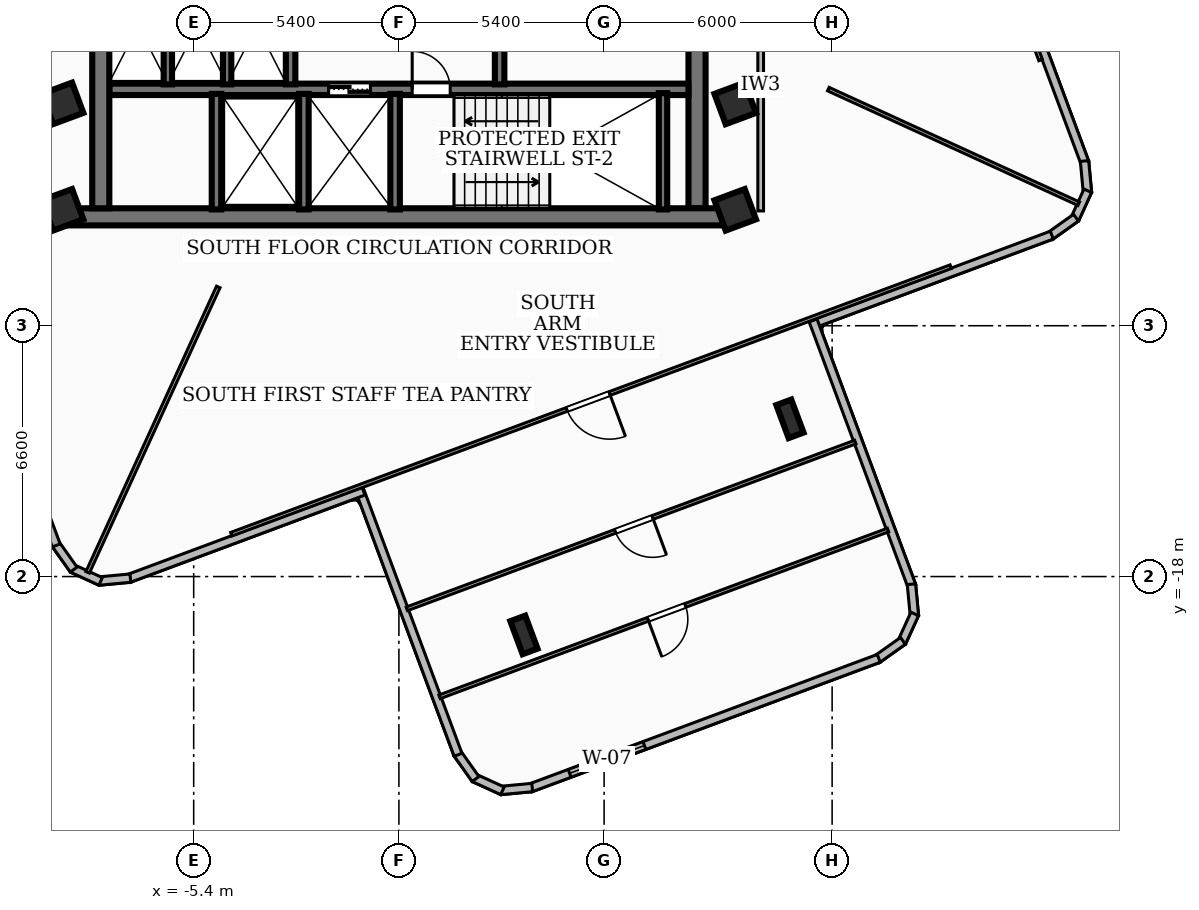
"""IFC4 building model, lengths in metres.
Left out: names, types, materials, properties, quantities, classifications, styles, units other than length and angle.
Written with IfcOpenShell. Run it as: python <this file> out.ifc"""

import sys

from ifc_helpers import new_model, si_unit, direction, frame, frame_2d, origin, origin_2d, place, context, subcontext, project, spatial, rectangle, i_section, extrude, element, fill, save


model = new_model("IFC4")
c1 = context("Model", 3, precision=1e-05, world=origin(), true_north=direction((0.0, 1.0)))
c2 = subcontext(c1, "Body", "Model", "MODEL_VIEW")
j1 = project(units=[si_unit("LENGTHUNIT", "METRE"), si_unit("PLANEANGLEUNIT", "RADIAN")], contexts=[c1])
p1 = place(None, origin())
s1 = spatial("IfcSite", under=j1, at=p1, CompositionType="ELEMENT")
p2 = place(p1, origin())
s2 = spatial("IfcBuilding", under=s1, at=p2, CompositionType="ELEMENT")
p3 = place(p2, frame((0.0, 0.0, 170.28)))
s3 = spatial("IfcBuildingStorey", under=s2, at=p3, CompositionType="ELEMENT", Elevation=170.28)
p4 = place(p3, frame((8.78, -8.535, 0.0), z_axis=(0.0, 0.0, 1.0), x_axis=(-1.0, 0.0, 0.0)))
e1 = element("IfcWall", 1, at=p4, inside=s3, PredefinedType="SHEAR", context=c2, shape_type="SweptSolid", body=[
    extrude(rectangle(XDim=17.56, YDim=0.45, at=frame_2d((8.78, 0.0))), origin(), (0.0, 0.0, 1.0), 3.34),
])
for number, where, z_axis, x_axis in (
    (2, (-7.845, -8.31, 0.0), (0.0, 0.0, 1.0), (0.0, 1.0, 0.0)),
    (3, (7.845, -1.975, 0.0), (0.0, 0.0, 1.0), (0.0, -1.0, 0.0)),
):
    element("IfcWall", number, at=place(p3, frame(where, z_axis=z_axis, x_axis=x_axis)), inside=s3, PredefinedType="SHEAR", context=c2, shape_type="SweptSolid", body=[
        extrude(rectangle(XDim=6.335, YDim=0.45, at=frame_2d((3.167, 0.0))), origin(), (0.0, 0.0, 1.0), 3.34),
    ])
p5 = place(p3, frame((-7.62, -5.18, 0.0), z_axis=(0.0, 0.0, 1.0), x_axis=(1.0, 0.0, 0.0)))
e4 = element("IfcWall", 4, at=p5, inside=s3, PredefinedType="SOLIDWALL", context=c2, shape_type="SweptSolid", body=[
    extrude(rectangle(XDim=15.24, YDim=0.3, at=frame_2d((7.62, 0.0))), origin(), (0.0, 0.0, 1.0), 3.34),
])
p6 = place(p5, frame((5.77, 0.0, 0.0)))
e5 = element("IfcOpeningElement", 5, at=p6, cuts=e4, PredefinedType="OPENING", context=c2, shape_type="SweptSolid", body=[
    extrude(rectangle(XDim=1.1, YDim=2.15, at=frame_2d((0.55, 1.075))), frame((0.0, 0.16, 0.0), z_axis=(0.0, -1.0, 0.0), x_axis=(1.0, 0.0, 0.0)), (0.0, 0.0, 1.0), 0.32),
])
p7 = place(p5, frame((7.97, 0.0, 0.0)))
e6 = element("IfcOpeningElement", 6, at=p7, cuts=e4, PredefinedType="OPENING", context=c2, shape_type="SweptSolid", body=[
    extrude(rectangle(XDim=1.0, YDim=2.1, at=frame_2d((0.5, 1.05))), frame((0.0, 0.16, 0.0), z_axis=(0.0, -1.0, 0.0), x_axis=(1.0, 0.0, 0.0)), (0.0, 0.0, 1.0), 0.32),
])
p8 = place(p3, frame((6.95, -8.34, 0.0), z_axis=(0.0, 0.0, 1.0), x_axis=(0.0, 1.0, 0.0)))
e7 = element("IfcWall", 7, at=p8, inside=s3, PredefinedType="SOLIDWALL", context=c2, shape_type="SweptSolid", body=[
    extrude(rectangle(XDim=3.06, YDim=0.22, at=frame_2d((1.53, 0.0))), origin(), (0.0, 0.0, 1.0), 3.34),
])
for number, where, z_axis, x_axis in (
    (8, (-0.1, -8.34, 0.0), (0.0, 0.0, 1.0), (0.0, 1.0, 0.0)),
    (9, (-2.5, -8.34, 0.0), (0.0, 0.0, 1.0), (0.0, 1.0, 0.0)),
    (10, (-4.8, -8.34, 0.0), (0.0, 0.0, 1.0), (0.0, 1.0, 0.0)),
):
    element("IfcWall", number, at=place(p3, frame(where, z_axis=z_axis, x_axis=x_axis)), inside=s3, PredefinedType="SOLIDWALL", context=c2, shape_type="SweptSolid", body=[
        extrude(rectangle(XDim=3.04, YDim=0.25, at=frame_2d((1.52, 0.0))), origin(), (0.0, 0.0, 1.0), 3.34),
    ])
for number, where, z_axis, x_axis in (
    (11, (-2.85, -5.05, 0.0), (0.0, 0.0, 1.0), (0.0, 1.0, 0.0)),
    (12, (2.65, -5.05, 0.0), (0.0, 0.0, 1.0), (0.0, 1.0, 0.0)),
):
    element("IfcWall", number, at=place(p3, frame(where, z_axis=z_axis, x_axis=x_axis)), inside=s3, PredefinedType="SOLIDWALL", context=c2, shape_type="SweptSolid", body=[
        extrude(rectangle(XDim=3.07, YDim=0.25, at=frame_2d((1.535, 0.0))), origin(), (0.0, 0.0, 1.0), 3.34),
    ])
for number, where, z_axis, x_axis in (
    (13, (-6.08, -5.05, 0.0), (0.0, 0.0, 1.0), (0.0, 1.0, 0.0)),
    (14, (-4.52, -5.05, 0.0), (0.0, 0.0, 1.0), (0.0, 1.0, 0.0)),
):
    element("IfcWall", number, at=place(p3, frame(where, z_axis=z_axis, x_axis=x_axis)), inside=s3, PredefinedType="SOLIDWALL", context=c2, shape_type="SweptSolid", body=[
        extrude(rectangle(XDim=3.07, YDim=0.22, at=frame_2d((1.535, 0.0))), origin(), (0.0, 0.0, 1.0), 3.34),
    ])
for number, where, z_axis, x_axis in (
    (15, (-8.85, -5.55, 0.0), (0.0, 0.0, 1.0), (0.937, 0.349, 0.0)),
    (16, (8.85, -5.55, 0.0), (0.0, 0.0, 1.0), (0.937, 0.349, 0.0)),
    (17, (8.85, -8.35, 0.0), (0.0, 0.0, 1.0), (0.937, 0.349, 0.0)),
    (18, (-8.85, -8.35, 0.0), (0.0, 0.0, 1.0), (0.937, 0.349, 0.0)),
):
    element("IfcColumn", number, at=place(p3, frame(where, z_axis=z_axis, x_axis=x_axis)), inside=s3, PredefinedType="COLUMN", context=c2, shape_type="SweptSolid", body=[
        extrude(rectangle(XDim=0.85, YDim=0.85, at=origin_2d()), origin(), (0.0, 0.0, 1.0), 3.6),
    ])
for number, where, z_axis, x_axis in (
    (19, (3.29, -19.536, 0.0), (0.0, 0.0, 1.0), (0.937, 0.349, 0.0)),
    (20, (10.29, -13.85, 0.0), (0.0, 0.0, 1.0), (0.937, 0.349, 0.0)),
):
    element("IfcColumn", number, at=place(p3, frame(where, z_axis=z_axis, x_axis=x_axis)), inside=s3, PredefinedType="COLUMN", context=c2, shape_type="SweptSolid", body=[
        extrude(i_section(OverallWidth=0.418, OverallDepth=0.927, WebThickness=0.019, FlangeThickness=0.032, at=origin_2d()), origin(), (0.0, 0.0, 1.0), 3.6),
    ])
p9 = place(p3, frame((15.751, -0.93, 0.0), z_axis=(0.0, 0.0, 1.0), x_axis=(0.348729932868, -0.937223257246, 0.0)))
e21 = element("IfcWall", 21, at=p9, inside=s3, PredefinedType="SOLIDWALL", context=c2, shape_type="SweptSolid", body=[
    extrude(rectangle(XDim=6.598, YDim=0.22, at=frame_2d((3.299, 0.0))), origin(), (0.0, 0.0, 1.0), 3.34),
])
p10 = place(p3, frame((18.041, -7.066, 0.0), z_axis=(0.0, 0.0, 1.0), x_axis=(0.09330446586, -0.995637623159, 0.0)))
e22 = element("IfcWall", 22, at=p10, inside=s3, PredefinedType="SOLIDWALL", context=c2, shape_type="SweptSolid", body=[
    extrude(rectangle(XDim=0.835, YDim=0.22, at=frame_2d((0.417, 0.0))), origin(), (0.0, 0.0, 1.0), 3.34),
])
p11 = place(p3, frame((18.127, -7.849, 0.0), z_axis=(0.0, 0.0, 1.0), x_axis=(-0.415083126143, -0.909783489843, 0.0)))
e23 = element("IfcWall", 23, at=p11, inside=s3, PredefinedType="SOLIDWALL", context=c2, shape_type="SweptSolid", body=[
    extrude(rectangle(XDim=0.819, YDim=0.22, at=frame_2d((0.409, 0.0))), origin(), (0.0, 0.0, 1.0), 3.34),
])
p12 = place(p3, frame((17.817, -8.557, 0.0), z_axis=(0.0, 0.0, 1.0), x_axis=(-0.815315167698, -0.579017424022, 0.0)))
e24 = element("IfcWall", 24, at=p12, inside=s3, PredefinedType="SOLIDWALL", context=c2, shape_type="SweptSolid", body=[
    extrude(rectangle(XDim=0.833, YDim=0.22, at=frame_2d((0.417, 0.0))), origin(), (0.0, 0.0, 1.0), 3.34),
])
p13 = place(p3, frame((17.181, -9.016, 0.0), z_axis=(0.0, 0.0, 1.0), x_axis=(-0.937216908499, -0.34874699486, 0.0)))
e25 = element("IfcWall", 25, at=p13, inside=s3, PredefinedType="SOLIDWALL", context=c2, shape_type="SweptSolid", body=[
    extrude(rectangle(XDim=6.758, YDim=0.22, at=frame_2d((3.379, 0.0))), origin(), (0.0, 0.0, 1.0), 3.34),
])
p14 = place(p3, frame((10.898, -11.26, 0.0), z_axis=(0.0, 0.0, 1.0), x_axis=(0.348636078187, -0.937258174137, 0.0)))
e26 = element("IfcWall", 26, at=p14, inside=s3, PredefinedType="SOLIDWALL", context=c2, shape_type="SweptSolid", body=[
    extrude(rectangle(XDim=7.458, YDim=0.22, at=frame_2d((3.729, 0.0))), origin(), (0.0, 0.0, 1.0), 3.34),
])
p15 = place(p3, frame((13.487, -18.202, 0.0), z_axis=(0.0, 0.0, 1.0), x_axis=(0.093413278521, -0.99562741997, 0.0)))
e27 = element("IfcWall", 27, at=p15, inside=s3, PredefinedType="SOLIDWALL", context=c2, shape_type="SweptSolid", body=[
    extrude(rectangle(XDim=0.834, YDim=0.22, at=frame_2d((0.417, 0.0))), origin(), (0.0, 0.0, 1.0), 3.34),
])
p16 = place(p3, frame((13.573, -18.984, 0.0), z_axis=(0.0, 0.0, 1.0), x_axis=(-0.41476734413, -0.909927497245, 0.0)))
e28 = element("IfcWall", 28, at=p16, inside=s3, PredefinedType="SOLIDWALL", context=c2, shape_type="SweptSolid", body=[
    extrude(rectangle(XDim=0.82, YDim=0.22, at=frame_2d((0.41, 0.0))), origin(), (0.0, 0.0, 1.0), 3.34),
])
p17 = place(p3, frame((13.263, -19.693, 0.0), z_axis=(0.0, 0.0, 1.0), x_axis=(-0.815453569677, -0.578822490666, 0.0)))
e29 = element("IfcWall", 29, at=p17, inside=s3, PredefinedType="SOLIDWALL", context=c2, shape_type="SweptSolid", body=[
    extrude(rectangle(XDim=0.833, YDim=0.22, at=frame_2d((0.416, 0.0))), origin(), (0.0, 0.0, 1.0), 3.34),
])
p18 = place(p3, frame((12.627, -20.152, 0.0), z_axis=(0.0, 0.0, 1.0), x_axis=(-0.937257326037, -0.348638358175, 0.0)))
e30 = element("IfcWall", 30, at=p18, inside=s3, PredefinedType="SOLIDWALL", context=c2, shape_type="SweptSolid", body=[
    extrude(rectangle(XDim=9.781, YDim=0.22, at=frame_2d((4.89, 0.0))), origin(), (0.0, 0.0, 1.0), 3.34),
])
p19 = place(p18, frame((6.579, 0.0, 0.85)))
e31 = element("IfcOpeningElement", 31, at=p19, cuts=e30, PredefinedType="OPENING", context=c2, shape_type="SweptSolid", body=[
    extrude(rectangle(XDim=2.1, YDim=1.8, at=frame_2d((1.05, 0.9))), frame((0.0, 0.12, 0.0), z_axis=(0.0, -1.0, 0.0), x_axis=(1.0, 0.0, 0.0)), (0.0, 0.0, 1.0), 0.24),
])
p20 = place(p3, frame((3.508, -23.551, 0.0), z_axis=(0.0, 0.0, 1.0), x_axis=(-0.995637623159, -0.09330446586, 0.0)))
e32 = element("IfcWall", 32, at=p20, inside=s3, PredefinedType="SOLIDWALL", context=c2, shape_type="SweptSolid", body=[
    extrude(rectangle(XDim=0.835, YDim=0.22, at=frame_2d((0.417, 0.0))), origin(), (0.0, 0.0, 1.0), 3.34),
])
p21 = place(p3, frame((2.725, -23.637, 0.0), z_axis=(0.0, 0.0, 1.0), x_axis=(-0.909834845619, 0.414970545577, 0.0)))
e33 = element("IfcWall", 33, at=p21, inside=s3, PredefinedType="SOLIDWALL", context=c2, shape_type="SweptSolid", body=[
    extrude(rectangle(XDim=0.819, YDim=0.22, at=frame_2d((0.409, 0.0))), origin(), (0.0, 0.0, 1.0), 3.34),
])
p22 = place(p3, frame((2.017, -23.327, 0.0), z_axis=(0.0, 0.0, 1.0), x_axis=(-0.579242960811, 0.815154949903, 0.0)))
e34 = element("IfcWall", 34, at=p22, inside=s3, PredefinedType="SOLIDWALL", context=c2, shape_type="SweptSolid", body=[
    extrude(rectangle(XDim=0.834, YDim=0.22, at=frame_2d((0.417, 0.0))), origin(), (0.0, 0.0, 1.0), 3.34),
])
p23 = place(p3, frame((1.557, -22.69, 0.0), z_axis=(0.0, 0.0, 1.0), x_axis=(-0.348607320852, 0.937268870628, 0.0)))
e35 = element("IfcWall", 35, at=p23, inside=s3, PredefinedType="SOLIDWALL", context=c2, shape_type="SweptSolid", body=[
    extrude(rectangle(XDim=7.458, YDim=0.22, at=frame_2d((3.729, 0.0))), origin(), (0.0, 0.0, 1.0), 2.644),
])
p24 = place(p3, frame((-0.93, -15.751, 0.0), z_axis=(0.0, 0.0, 1.0), x_axis=(-0.937223257246, -0.348729932868, 0.0)))
e36 = element("IfcWall", 36, at=p24, inside=s3, PredefinedType="SOLIDWALL", context=c2, shape_type="SweptSolid", body=[
    extrude(rectangle(XDim=6.598, YDim=0.22, at=frame_2d((3.299, 0.0))), origin(), (0.0, 0.0, 1.0), 2.644),
])
p25 = place(p3, frame((-7.066, -18.041, 0.0), z_axis=(0.0, 0.0, 1.0), x_axis=(-0.995637623159, -0.09330446586, 0.0)))
e37 = element("IfcWall", 37, at=p25, inside=s3, PredefinedType="SOLIDWALL", context=c2, shape_type="SweptSolid", body=[
    extrude(rectangle(XDim=0.835, YDim=0.22, at=frame_2d((0.417, 0.0))), origin(), (0.0, 0.0, 1.0), 3.34),
])
p26 = place(p3, frame((-7.849, -18.127, 0.0), z_axis=(0.0, 0.0, 1.0), x_axis=(-0.909783489843, 0.415083126143, 0.0)))
e38 = element("IfcWall", 38, at=p26, inside=s3, PredefinedType="SOLIDWALL", context=c2, shape_type="SweptSolid", body=[
    extrude(rectangle(XDim=0.819, YDim=0.22, at=frame_2d((0.409, 0.0))), origin(), (0.0, 0.0, 1.0), 3.34),
])
p27 = place(p3, frame((-8.557, -17.817, 0.0), z_axis=(0.0, 0.0, 1.0), x_axis=(-0.579017424022, 0.815315167698, 0.0)))
e39 = element("IfcWall", 39, at=p27, inside=s3, PredefinedType="SOLIDWALL", context=c2, shape_type="SweptSolid", body=[
    extrude(rectangle(XDim=0.833, YDim=0.22, at=frame_2d((0.417, 0.0))), origin(), (0.0, 0.0, 1.0), 3.34),
])
p28 = place(p3, frame((-9.016, -17.181, 0.0), z_axis=(0.0, 0.0, 1.0), x_axis=(-0.34874699486, 0.937216908499, 0.0)))
e40 = element("IfcWall", 40, at=p28, inside=s3, PredefinedType="SOLIDWALL", context=c2, shape_type="SweptSolid", body=[
    extrude(rectangle(XDim=6.758, YDim=0.22, at=frame_2d((3.379, 0.0))), origin(), (0.0, 0.0, 1.0), 2.72),
])
p29 = place(p3, frame((9.52, -8.38, 0.0), z_axis=(0.0, 0.0, 1.0), x_axis=(0.0, 1.0, 0.0)))
e41 = element("IfcWall", 41, at=p29, inside=s3, PredefinedType="PARTITIONING", context=c2, shape_type="SweptSolid", body=[
    extrude(rectangle(XDim=6.63, YDim=0.15, at=frame_2d((3.315, 0.0))), origin(), (0.0, 0.0, 1.0), 3.34),
])
p30 = place(p3, frame((-4.753, -10.38, 0.0), z_axis=(0.0, 0.0, 1.0), x_axis=(-0.416191484634, -0.909276991966, 0.0)))
e42 = element("IfcWall", 42, at=p30, inside=s3, PredefinedType="PARTITIONING", context=c2, shape_type="SweptSolid", body=[
    extrude(rectangle(XDim=8.258, YDim=0.1, at=frame_2d((4.129, 0.0))), origin(), (0.0, 0.0, 1.0), 2.644),
])
p31 = place(p3, frame((11.3, -5.174, 0.0), z_axis=(0.0, 0.0, 1.0), x_axis=(0.909275268701, -0.416195249528, 0.0)))
e43 = element("IfcWall", 43, at=p31, inside=s3, PredefinedType="PARTITIONING", context=c2, shape_type="SweptSolid", body=[
    extrude(rectangle(XDim=7.246, YDim=0.1, at=frame_2d((3.623, 0.0))), origin(), (0.0, 0.0, 1.0), 3.34),
])
p32 = place(p3, frame((9.846, 14.522, 0.0), z_axis=(0.0, 0.0, 1.0), x_axis=(0.348543090668, -0.937292757866, 0.0)))
e44 = element("IfcWall", 44, at=p32, inside=s3, PredefinedType="PARTITIONING", context=c2, shape_type="SweptSolid", body=[
    extrude(rectangle(XDim=20.198, YDim=0.1, at=frame_2d((10.099, 0.0))), origin(), (0.0, 0.0, 1.0), 2.644),
])
p33 = place(p32, frame((9.579, 0.0, 0.0)))
e45 = element("IfcOpeningElement", 45, at=p33, cuts=e44, PredefinedType="OPENING", context=c2, shape_type="SweptSolid", body=[
    extrude(rectangle(XDim=1.2, YDim=2.1, at=frame_2d((0.6, 1.05))), frame((0.0, 0.06, 0.0), z_axis=(0.0, -1.0, 0.0), x_axis=(1.0, 0.0, 0.0)), (0.0, 0.0, 1.0), 0.12),
])
p34 = place(p3, frame((14.522, -9.846, 0.0), z_axis=(0.0, 0.0, 1.0), x_axis=(-0.937292757866, -0.348543090668, 0.0)))
e46 = element("IfcWall", 46, at=p34, inside=s3, PredefinedType="PARTITIONING", context=c2, shape_type="SweptSolid", body=[
    extrude(rectangle(XDim=20.198, YDim=0.1, at=frame_2d((10.099, 0.0))), origin(), (0.0, 0.0, 1.0), 2.644),
])
p35 = place(p34, frame((9.579, 0.0, 0.0)))
e47 = element("IfcOpeningElement", 47, at=p35, cuts=e46, PredefinedType="OPENING", context=c2, shape_type="SweptSolid", body=[
    extrude(rectangle(XDim=1.2, YDim=2.1, at=frame_2d((0.6, 1.05))), frame((0.0, 0.06, 0.0), z_axis=(0.0, -1.0, 0.0), x_axis=(1.0, 0.0, 0.0)), (0.0, 0.0, 1.0), 0.12),
])
p36 = place(p3, frame((12.009, -14.461, 0.0), z_axis=(0.0, 0.0, 1.0), x_axis=(-0.937262231235, -0.348625171066, 0.0)))
e48 = element("IfcWall", 48, at=p36, inside=s3, PredefinedType="PARTITIONING", context=c2, shape_type="SweptSolid", body=[
    extrude(rectangle(XDim=12.59, YDim=0.1, at=frame_2d((6.295, 0.0))), origin(), (0.0, 0.0, 1.0), 2.644),
])
p37 = place(p36, frame((5.69, 0.0, 0.0)))
e49 = element("IfcOpeningElement", 49, at=p37, cuts=e48, PredefinedType="OPENING", context=c2, shape_type="SweptSolid", body=[
    extrude(rectangle(XDim=1.05, YDim=2.08, at=frame_2d((0.525, 1.04))), frame((0.0, 0.06, 0.0), z_axis=(0.0, -1.0, 0.0), x_axis=(1.0, 0.0, 0.0)), (0.0, 0.0, 1.0), 0.12),
])
p38 = place(p3, frame((12.87, -16.776, 0.0), z_axis=(0.0, 0.0, 1.0), x_axis=(-0.937262231235, -0.348625171066, 0.0)))
e50 = element("IfcWall", 50, at=p38, inside=s3, PredefinedType="PARTITIONING", context=c2, shape_type="SweptSolid", body=[
    extrude(rectangle(XDim=12.59, YDim=0.1, at=frame_2d((6.295, 0.0))), origin(), (0.0, 0.0, 1.0), 3.34),
])
p39 = place(p38, frame((5.69, 0.0, 0.0)))
e51 = element("IfcOpeningElement", 51, at=p39, cuts=e50, PredefinedType="OPENING", context=c2, shape_type="SweptSolid", body=[
    extrude(rectangle(XDim=1.05, YDim=2.08, at=frame_2d((0.525, 1.04))), frame((0.0, 0.06, 0.0), z_axis=(0.0, -1.0, 0.0), x_axis=(1.0, 0.0, 0.0)), (0.0, 0.0, 1.0), 0.12),
])
p40 = place(p19, origin())
e52 = element("IfcWindow", 52, at=p40, inside=s3, PartitioningType="SINGLE_PANEL", PredefinedType="WINDOW", context=c2, shape_type="SweptSolid", body=[
    extrude(rectangle(XDim=2.1, YDim=1.8, at=frame_2d((1.05, 0.9))), frame((0.0, 0.03, 0.0), z_axis=(0.0, -1.0, 0.0), x_axis=(1.0, 0.0, 0.0)), (0.0, 0.0, 1.0), 0.06),
])
fill(e31, e52)
p41 = place(p6, origin())
e53 = element("IfcDoor", 53, at=p41, inside=s3, OperationType="DOUBLE_DOOR_SLIDING", PredefinedType="DOOR", context=c2, shape_type="SweptSolid", body=[
    extrude(rectangle(XDim=1.1, YDim=2.15, at=frame_2d((0.55, 1.075))), frame((0.0, 0.025, 0.0), z_axis=(0.0, -1.0, 0.0), x_axis=(1.0, 0.0, 0.0)), (0.0, 0.0, 1.0), 0.05),
])
fill(e5, e53)
p42 = place(p7, origin())
e54 = element("IfcDoor", 54, at=p42, inside=s3, OperationType="SINGLE_SWING_LEFT", PredefinedType="DOOR", context=c2, shape_type="SweptSolid", body=[
    extrude(rectangle(XDim=1.0, YDim=2.1, at=frame_2d((0.5, 1.05))), frame((0.0, 0.025, 0.0), z_axis=(0.0, -1.0, 0.0), x_axis=(1.0, 0.0, 0.0)), (0.0, 0.0, 1.0), 0.05),
])
fill(e6, e54)
p43 = place(p35, origin())
e55 = element("IfcDoor", 55, at=p43, inside=s3, OperationType="SINGLE_SWING_LEFT", PredefinedType="DOOR", context=c2, shape_type="SweptSolid", body=[
    extrude(rectangle(XDim=1.2, YDim=2.1, at=frame_2d((0.6, 1.05))), frame((0.0, 0.025, 0.0), z_axis=(0.0, -1.0, 0.0), x_axis=(1.0, 0.0, 0.0)), (0.0, 0.0, 1.0), 0.05),
])
fill(e47, e55)
p44 = place(p37, origin())
e56 = element("IfcDoor", 56, at=p44, inside=s3, OperationType="SINGLE_SWING_LEFT", PredefinedType="DOOR", context=c2, shape_type="SweptSolid", body=[
    extrude(rectangle(XDim=1.05, YDim=2.08, at=frame_2d((0.525, 1.04))), frame((0.0, 0.025, 0.0), z_axis=(0.0, -1.0, 0.0), x_axis=(1.0, 0.0, 0.0)), (0.0, 0.0, 1.0), 0.05),
])
fill(e49, e56)
p45 = place(p39, origin())
e57 = element("IfcDoor", 57, at=p45, inside=s3, OperationType="SINGLE_SWING_RIGHT", PredefinedType="DOOR", context=c2, shape_type="SweptSolid", body=[
    extrude(rectangle(XDim=1.05, YDim=2.08, at=frame_2d((0.525, 1.04))), frame((0.0, 0.025, 0.0), z_axis=(0.0, -1.0, 0.0), x_axis=(1.0, 0.0, 0.0)), (0.0, 0.0, 1.0), 0.05),
])
fill(e51, e57)
save(model, sys.argv[1])
